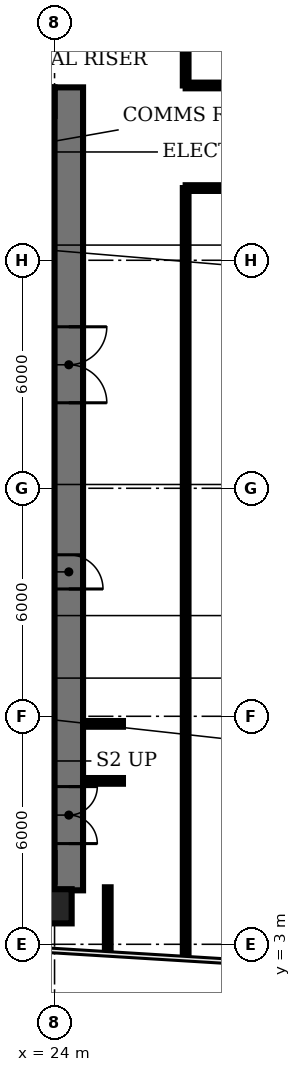
"""IFC4 building model, lengths in metres.
Left out: names, types, materials, properties, quantities, classifications, styles, units other than length and angle.
Written with IfcOpenShell. Run it as: python <this file> out.ifc"""

import sys

from ifc_helpers import new_model, si_unit, direction, frame, frame_2d, origin, origin_2d, place, context, subcontext, project, spatial, rectangle, extrude, element, fill, save


model = new_model("IFC4")
c1 = context("Model", 3, precision=1e-05, world=origin(), true_north=direction((0.0, 1.0)))
c2 = subcontext(c1, "Body", "Model", "MODEL_VIEW")
j1 = project(units=[si_unit("LENGTHUNIT", "METRE"), si_unit("PLANEANGLEUNIT", "RADIAN")], contexts=[c1])
p1 = place(None, origin())
s1 = spatial("IfcSite", under=j1, at=p1, CompositionType="ELEMENT")
p2 = place(p1, origin())
s2 = spatial("IfcBuilding", under=s1, at=p2, CompositionType="ELEMENT")
p3 = place(p2, frame((0.0, 0.0, 125.6)))
s3 = spatial("IfcBuildingStorey", under=s2, at=p3, CompositionType="ELEMENT", Elevation=125.6)
p4 = place(p3, frame((24.0, 4.0, 0.0), z_axis=(0.0, 0.0, 1.0), x_axis=(1.0, 0.0, 0.0)))
e1 = element("IfcColumn", 1, at=p4, inside=s3, PredefinedType="COLUMN", context=c2, shape_type="SweptSolid", body=[
    extrude(rectangle(XDim=0.9, YDim=0.9, at=origin_2d()), origin(), (0.0, 0.0, 1.0), 3.85),
])
p5 = place(p3, frame((20.85, 11.825, 0.0), z_axis=(0.0, 0.0, 1.0), x_axis=(1.0, 0.0, 0.0)))
e2 = element("IfcWall", 2, at=p5, inside=s3, PredefinedType="SHEAR", context=c2, shape_type="SweptSolid", body=[
    extrude(rectangle(XDim=3.15, YDim=0.25, at=frame_2d((1.575, 0.0))), origin(), (0.0, 0.0, 1.0), 3.85),
])
p6 = place(p3, frame((16.6, 13.7, 0.0), z_axis=(0.0, 0.0, 1.0), x_axis=(1.0, 0.0, 0.0)))
e3 = element("IfcWall", 3, at=p6, inside=s3, PredefinedType="PARTITIONING", context=c2, shape_type="SweptSolid", body=[
    extrude(rectangle(XDim=7.4, YDim=0.225, at=frame_2d((3.7, 0.0))), origin(), (0.0, 0.0, 1.0), 3.85),
])
p7 = place(p3, frame((9.4, 16.5, 0.0), z_axis=(0.0, 0.0, 1.0), x_axis=(1.0, 0.0, 0.0)))
e4 = element("IfcWall", 4, at=p7, inside=s3, PredefinedType="PARTITIONING", context=c2, shape_type="SweptSolid", body=[
    extrude(rectangle(XDim=14.6, YDim=0.225, at=frame_2d((7.3, 0.0))), origin(), (0.0, 0.0, 1.0), 3.85),
])
p8 = place(p7, frame((0.75, 0.0, 0.0)))
e5 = element("IfcOpeningElement", 5, at=p8, cuts=e4, PredefinedType="OPENING", context=c2, shape_type="SweptSolid", body=[
    extrude(rectangle(XDim=1.1, YDim=2.1, at=frame_2d((0.55, 1.05))), frame((0.0, 0.123, 0.0), z_axis=(0.0, -1.0, 0.0), x_axis=(1.0, 0.0, 0.0)), (0.0, 0.0, 1.0), 0.245),
])
p9 = place(p7, frame((3.55, 0.0, 0.0)))
e6 = element("IfcOpeningElement", 6, at=p9, cuts=e4, PredefinedType="OPENING", context=c2, shape_type="SweptSolid", body=[
    extrude(rectangle(XDim=1.1, YDim=2.1, at=frame_2d((0.55, 1.05))), frame((0.0, 0.123, 0.0), z_axis=(0.0, -1.0, 0.0), x_axis=(1.0, 0.0, 0.0)), (0.0, 0.0, 1.0), 0.245),
])
p10 = place(p7, frame((6.35, 0.0, 0.0)))
e7 = element("IfcOpeningElement", 7, at=p10, cuts=e4, PredefinedType="OPENING", context=c2, shape_type="SweptSolid", body=[
    extrude(rectangle(XDim=1.1, YDim=2.1, at=frame_2d((0.55, 1.05))), frame((0.0, 0.123, 0.0), z_axis=(0.0, -1.0, 0.0), x_axis=(1.0, 0.0, 0.0)), (0.0, 0.0, 1.0), 0.245),
])
p11 = place(p7, frame((9.15, 0.0, 0.0)))
e8 = element("IfcOpeningElement", 8, at=p11, cuts=e4, PredefinedType="OPENING", context=c2, shape_type="SweptSolid", body=[
    extrude(rectangle(XDim=1.1, YDim=2.1, at=frame_2d((0.55, 1.05))), frame((0.0, 0.123, 0.0), z_axis=(0.0, -1.0, 0.0), x_axis=(1.0, 0.0, 0.0)), (0.0, 0.0, 1.0), 0.245),
])
p12 = place(p7, frame((12.4, 0.0, 0.0)))
e9 = element("IfcOpeningElement", 9, at=p12, cuts=e4, PredefinedType="OPENING", context=c2, shape_type="SweptSolid", body=[
    extrude(rectangle(XDim=1.0, YDim=2.1, at=frame_2d((0.5, 1.05))), frame((0.0, 0.123, 0.0), z_axis=(0.0, -1.0, 0.0), x_axis=(1.0, 0.0, 0.0)), (0.0, 0.0, 1.0), 0.245),
])
p13 = place(p3, frame((24.0, 20.0, 0.0), z_axis=(0.0, 0.0, 1.0), x_axis=(-1.0, 0.0, 0.0)))
e10 = element("IfcWall", 10, at=p13, inside=s3, PredefinedType="PARTITIONING", context=c2, shape_type="SweptSolid", body=[
    extrude(rectangle(XDim=14.6, YDim=0.225, at=frame_2d((7.3, 0.0))), origin(), (0.0, 0.0, 1.0), 3.85),
])
p14 = place(p13, frame((12.5, 0.0, 0.0)))
e11 = element("IfcOpeningElement", 11, at=p14, cuts=e10, PredefinedType="OPENING", context=c2, shape_type="SweptSolid", body=[
    extrude(rectangle(XDim=1.0, YDim=2.1, at=frame_2d((0.5, 1.05))), frame((0.0, 0.123, 0.0), z_axis=(0.0, -1.0, 0.0), x_axis=(1.0, 0.0, 0.0)), (0.0, 0.0, 1.0), 0.245),
])
p15 = place(p13, frame((8.825, 0.0, 0.0)))
e12 = element("IfcOpeningElement", 12, at=p15, cuts=e10, PredefinedType="OPENING", context=c2, shape_type="SweptSolid", body=[
    extrude(rectangle(XDim=1.0, YDim=2.1, at=frame_2d((0.5, 1.05))), frame((0.0, 0.123, 0.0), z_axis=(0.0, -1.0, 0.0), x_axis=(1.0, 0.0, 0.0)), (0.0, 0.0, 1.0), 0.245),
])
p16 = place(p13, frame((4.925, 0.0, 0.0)))
e13 = element("IfcOpeningElement", 13, at=p16, cuts=e10, PredefinedType="OPENING", context=c2, shape_type="SweptSolid", body=[
    extrude(rectangle(XDim=1.0, YDim=2.1, at=frame_2d((0.5, 1.05))), frame((0.0, 0.123, 0.0), z_axis=(0.0, -1.0, 0.0), x_axis=(1.0, 0.0, 0.0)), (0.0, 0.0, 1.0), 0.245),
])
p17 = place(p13, frame((1.2, 0.0, 0.0)))
e14 = element("IfcOpeningElement", 14, at=p17, cuts=e10, PredefinedType="OPENING", context=c2, shape_type="SweptSolid", body=[
    extrude(rectangle(XDim=1.0, YDim=2.1, at=frame_2d((0.5, 1.05))), frame((0.0, 0.123, 0.0), z_axis=(0.0, -1.0, 0.0), x_axis=(1.0, 0.0, 0.0)), (0.0, 0.0, 1.0), 0.245),
])
p18 = place(p3, frame((9.4, 22.8, 0.0), z_axis=(0.0, 0.0, 1.0), x_axis=(1.0, 0.0, 0.0)))
e15 = element("IfcWall", 15, at=p18, inside=s3, PredefinedType="PARTITIONING", context=c2, shape_type="SweptSolid", body=[
    extrude(rectangle(XDim=14.6, YDim=0.225, at=frame_2d((7.3, 0.0))), origin(), (0.0, 0.0, 1.0), 3.85),
])
p19 = place(p3, frame((24.375, 25.55, 0.0), z_axis=(0.0, 0.0, 1.0), x_axis=(0.0, -1.0, 0.0)))
e16 = element("IfcWall", 16, at=p19, inside=s3, PredefinedType="SHEAR", context=c2, shape_type="SweptSolid", body=[
    extrude(rectangle(XDim=21.13, YDim=0.75, at=frame_2d((10.565, 0.0))), origin(), (0.0, 0.0, 1.0), 3.85),
])
p20 = place(p19, frame((18.4, 0.0, 0.0)))
e17 = element("IfcOpeningElement", 17, at=p20, cuts=e16, PredefinedType="OPENING", context=c2, shape_type="SweptSolid", body=[
    extrude(rectangle(XDim=1.5, YDim=2.1, at=frame_2d((0.75, 1.05))), frame((0.0, 0.385, 0.0), z_axis=(0.0, -1.0, 0.0), x_axis=(1.0, 0.0, 0.0)), (0.0, 0.0, 1.0), 0.77),
])
p21 = place(p19, frame((12.3, 0.0, 0.0)))
e18 = element("IfcOpeningElement", 18, at=p21, cuts=e16, PredefinedType="OPENING", context=c2, shape_type="SweptSolid", body=[
    extrude(rectangle(XDim=0.9, YDim=2.1, at=frame_2d((0.45, 1.05))), frame((0.0, 0.385, 0.0), z_axis=(0.0, -1.0, 0.0), x_axis=(1.0, 0.0, 0.0)), (0.0, 0.0, 1.0), 0.77),
])
p22 = place(p19, frame((6.3, 0.0, 0.0)))
e19 = element("IfcOpeningElement", 19, at=p22, cuts=e16, PredefinedType="OPENING", context=c2, shape_type="SweptSolid", body=[
    extrude(rectangle(XDim=2.0, YDim=2.1, at=frame_2d((1.0, 1.05))), frame((0.0, 0.385, 0.0), z_axis=(0.0, -1.0, 0.0), x_axis=(1.0, 0.0, 0.0)), (0.0, 0.0, 1.0), 0.77),
])
p23 = place(p3, frame((24.0, 5.025, 0.0), z_axis=(0.0, 0.0, 1.0), x_axis=(-1.0, 0.0, 0.0)))
e20 = element("IfcWall", 20, at=p23, inside=s3, PredefinedType="SHEAR", context=c2, shape_type="SweptSolid", body=[
    extrude(rectangle(XDim=18.0, YDim=0.75, at=frame_2d((9.0, 0.0))), origin(), (0.0, 0.0, 1.0), 3.85),
])
p24 = place(p23, frame((0.825, 0.0, 0.0)))
e21 = element("IfcOpeningElement", 21, at=p24, cuts=e20, PredefinedType="OPENING", context=c2, shape_type="SweptSolid", body=[
    extrude(rectangle(XDim=1.5, YDim=2.1, at=frame_2d((0.75, 1.05))), frame((0.0, 0.385, 0.0), z_axis=(0.0, -1.0, 0.0), x_axis=(1.0, 0.0, 0.0)), (0.0, 0.0, 1.0), 0.77),
])
p25 = place(p23, frame((15.675, 0.0, 0.0)))
e22 = element("IfcOpeningElement", 22, at=p25, cuts=e20, PredefinedType="OPENING", context=c2, shape_type="SweptSolid", body=[
    extrude(rectangle(XDim=1.5, YDim=2.1, at=frame_2d((0.75, 1.05))), frame((0.0, 0.385, 0.0), z_axis=(0.0, -1.0, 0.0), x_axis=(1.0, 0.0, 0.0)), (0.0, 0.0, 1.0), 0.77),
])
p26 = place(p23, frame((13.0, 0.0, 0.0)))
e23 = element("IfcOpeningElement", 23, at=p26, cuts=e20, PredefinedType="OPENING", context=c2, shape_type="SweptSolid", body=[
    extrude(rectangle(XDim=1.2, YDim=2.1, at=frame_2d((0.6, 1.05))), frame((0.0, 0.385, 0.0), z_axis=(0.0, -1.0, 0.0), x_axis=(1.0, 0.0, 0.0)), (0.0, 0.0, 1.0), 0.77),
])
p27 = place(p23, frame((4.35, 0.0, 0.0)))
e24 = element("IfcOpeningElement", 24, at=p27, cuts=e20, PredefinedType="OPENING", context=c2, shape_type="SweptSolid", body=[
    extrude(rectangle(XDim=1.0, YDim=2.1, at=frame_2d((0.5, 1.05))), frame((0.0, 0.385, 0.0), z_axis=(0.0, -1.0, 0.0), x_axis=(1.0, 0.0, 0.0)), (0.0, 0.0, 1.0), 0.77),
])
p28 = place(p3, frame((6.0, 25.175, 0.0), z_axis=(0.0, 0.0, 1.0), x_axis=(1.0, 0.0, 0.0)))
e25 = element("IfcWall", 25, at=p28, inside=s3, PredefinedType="SHEAR", context=c2, shape_type="SweptSolid", body=[
    extrude(rectangle(XDim=18.0, YDim=0.75, at=frame_2d((9.0, 0.0))), origin(), (0.0, 0.0, 1.0), 3.85),
])
for number, where, z_axis, x_axis in (
    (26, (24.75, 7.3, 0.0), (0.0, 0.0, 1.0), (1.0, 0.0, 0.0)),
    (27, (24.75, 8.8, 0.0), (0.0, 0.0, 1.0), (1.0, 0.0, 0.0)),
):
    element("IfcWall", number, at=place(p3, frame(where, z_axis=z_axis, x_axis=x_axis)), inside=s3, PredefinedType="PARTITIONING", context=c2, shape_type="SweptSolid", body=[
        extrude(rectangle(XDim=1.05, YDim=0.15, at=frame_2d((0.525, 0.0))), origin(), (0.0, 0.0, 1.0), 2.83),
    ])
p29 = place(p3, frame((25.4, 2.8, 0.0), z_axis=(0.0, 0.0, 1.0), x_axis=(0.0, 1.0, 0.0)))
e28 = element("IfcWall", 28, at=p29, inside=s3, PredefinedType="PARTITIONING", context=c2, shape_type="SweptSolid", body=[
    extrude(rectangle(XDim=1.7, YDim=0.15, at=frame_2d((0.85, 0.0))), origin(), (0.0, 0.0, 1.0), 2.83),
])
p30 = place(p3, frame((27.45, 2.67, 0.0), z_axis=(0.0, 0.0, 1.0), x_axis=(0.0, 1.0, 0.0)))
e29 = element("IfcWall", 29, at=p30, inside=s3, PredefinedType="PARTITIONING", context=c2, shape_type="SweptSolid", body=[
    extrude(rectangle(XDim=20.23, YDim=0.15, at=frame_2d((10.115, 0.0))), origin(), (0.0, 0.0, 1.0), 2.83),
])
p31 = place(p3, frame((27.45, 25.6, 0.0), z_axis=(0.0, 0.0, 1.0), x_axis=(0.0, 1.0, 0.0)))
e30 = element("IfcWall", 30, at=p31, inside=s3, PredefinedType="PARTITIONING", context=c2, shape_type="SweptSolid", body=[
    extrude(rectangle(XDim=3.85, YDim=0.15, at=frame_2d((1.925, 0.0))), origin(), (0.0, 0.0, 1.0), 2.83),
])
p32 = place(p3, frame((27.45, 25.6, 0.0), z_axis=(0.0, 0.0, 1.0), x_axis=(1.0, 0.0, 0.0)))
e31 = element("IfcWall", 31, at=p32, inside=s3, PredefinedType="PARTITIONING", context=c2, shape_type="SweptSolid", body=[
    extrude(rectangle(XDim=8.55, YDim=0.15, at=frame_2d((4.275, 0.0))), origin(), (0.0, 0.0, 1.0), 2.83),
])
p33 = place(p32, frame((4.05, 0.0, 0.0)))
e32 = element("IfcOpeningElement", 32, at=p33, cuts=e31, PredefinedType="OPENING", context=c2, shape_type="SweptSolid", body=[
    extrude(rectangle(XDim=1.0, YDim=2.1, at=frame_2d((0.5, 1.05))), frame((0.0, 0.085, 0.0), z_axis=(0.0, -1.0, 0.0), x_axis=(1.0, 0.0, 0.0)), (0.0, 0.0, 1.0), 0.17),
])
p34 = place(p3, frame((48.0, 22.9, 0.0), z_axis=(0.0, 0.0, 1.0), x_axis=(-1.0, 0.0, 0.0)))
e33 = element("IfcWall", 33, at=p34, inside=s3, PredefinedType="PARTITIONING", context=c2, shape_type="SweptSolid", body=[
    extrude(rectangle(XDim=20.55, YDim=0.15, at=frame_2d((10.275, 0.0))), origin(), (0.0, 0.0, 1.0), 2.83),
])
p35 = place(p34, frame((9.55, 0.0, 0.0)))
e34 = element("IfcOpeningElement", 34, at=p35, cuts=e33, PredefinedType="OPENING", context=c2, shape_type="SweptSolid", body=[
    extrude(rectangle(XDim=1.2, YDim=2.1, at=frame_2d((0.6, 1.05))), frame((0.0, 0.085, 0.0), z_axis=(0.0, -1.0, 0.0), x_axis=(1.0, 0.0, 0.0)), (0.0, 0.0, 1.0), 0.17),
])
p36 = place(p20, origin())
e35 = element("IfcDoor", 35, at=p36, inside=s3, OperationType="DOUBLE_DOOR_SINGLE_SWING", PredefinedType="DOOR", context=c2, shape_type="SweptSolid", body=[
    extrude(rectangle(XDim=1.5, YDim=2.1, at=frame_2d((0.75, 1.05))), frame((0.0, 0.025, 0.0), z_axis=(0.0, -1.0, 0.0), x_axis=(1.0, 0.0, 0.0)), (0.0, 0.0, 1.0), 0.05),
])
fill(e17, e35)
p37 = place(p21, origin())
e36 = element("IfcDoor", 36, at=p37, inside=s3, OperationType="SINGLE_SWING_RIGHT", PredefinedType="DOOR", context=c2, shape_type="SweptSolid", body=[
    extrude(rectangle(XDim=0.9, YDim=2.1, at=frame_2d((0.45, 1.05))), frame((0.0, -0.315, 0.0), z_axis=(0.0, -1.0, 0.0), x_axis=(1.0, 0.0, 0.0)), (0.0, 0.0, 1.0), 0.05),
])
fill(e18, e36)
p38 = place(p22, origin())
e37 = element("IfcDoor", 37, at=p38, inside=s3, OperationType="DOUBLE_DOOR_SINGLE_SWING", PredefinedType="DOOR", context=c2, shape_type="SweptSolid", body=[
    extrude(rectangle(XDim=2.0, YDim=2.1, at=frame_2d((1.0, 1.05))), frame((0.0, 0.025, 0.0), z_axis=(0.0, -1.0, 0.0), x_axis=(1.0, 0.0, 0.0)), (0.0, 0.0, 1.0), 0.05),
])
fill(e19, e37)
save(model, sys.argv[1])
